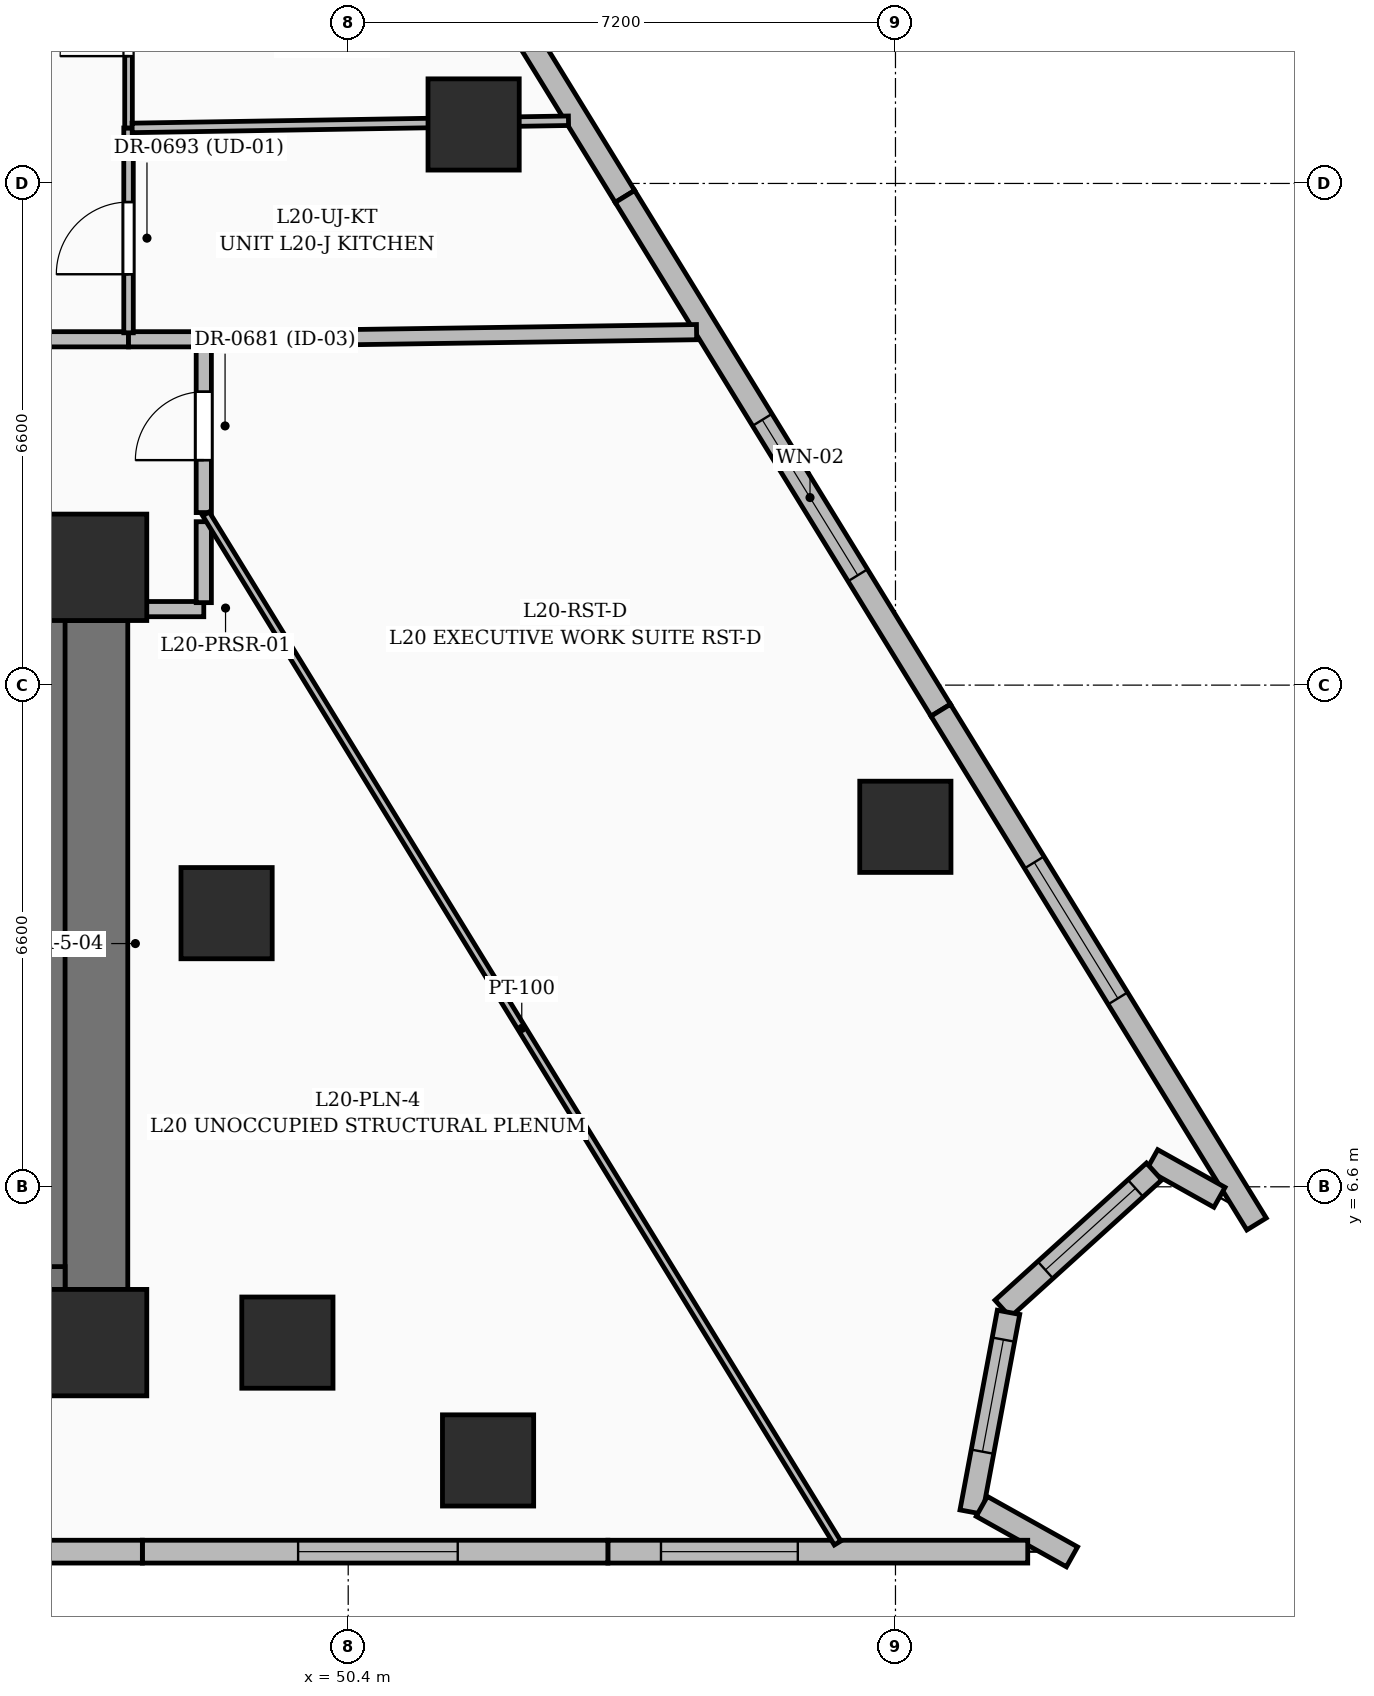
"""IFC4 building model, lengths in metres.
Left out: names, types, materials, properties, quantities, classifications, styles, units other than length and angle.
Written with IfcOpenShell. Run it as: python <this file> out.ifc"""

import sys

from ifc_helpers import new_model, si_unit, direction, frame, frame_2d, origin, origin_2d, place, context, subcontext, project, spatial, rectangle, extrude, element, fill, save


model = new_model("IFC4")
c1 = context("Model", 3, precision=1e-05, world=origin(), true_north=direction((0.0, 1.0)))
c2 = subcontext(c1, "Body", "Model", "MODEL_VIEW")
j1 = project(units=[si_unit("LENGTHUNIT", "METRE"), si_unit("PLANEANGLEUNIT", "RADIAN")], contexts=[c1])
p1 = place(None, origin())
s1 = spatial("IfcSite", under=j1, at=p1, CompositionType="ELEMENT")
p2 = place(p1, origin())
s2 = spatial("IfcBuilding", under=s1, at=p2, CompositionType="ELEMENT")
p3 = place(p2, frame((0.0, 0.0, 82.2)))
s3 = spatial("IfcBuildingStorey", under=s2, at=p3, CompositionType="ELEMENT", Elevation=82.2)
for number, where, z_axis, x_axis in (
    (1, (47.05, 4.55, 0.0), (0.0, 0.0, 1.0), (1.0, 0.0, 0.0)),
    (2, (47.05, 14.75, 0.0), (0.0, 0.0, 1.0), (1.0, 0.0, 0.0)),
):
    element("IfcColumn", number, at=place(p3, frame(where, z_axis=z_axis, x_axis=x_axis)), inside=s3, PredefinedType="COLUMN", context=c2, shape_type="SweptSolid", body=[
        extrude(rectangle(XDim=1.4, YDim=1.4, at=origin_2d()), origin(), (0.0, 0.0, 1.0), 3.6),
    ])
for number, where, z_axis, x_axis in (
    (3, (49.6, 4.55, 0.0), (0.0, 0.0, 1.0), (1.0, 0.0, 0.0)),
    (4, (48.8, 10.2, 0.0), (0.0, 0.0, 1.0), (1.0, 0.0, 0.0)),
):
    element("IfcColumn", number, at=place(p3, frame(where, z_axis=z_axis, x_axis=x_axis)), inside=s3, PredefinedType="COLUMN", context=c2, shape_type="SweptSolid", body=[
        extrude(rectangle(XDim=1.2, YDim=1.2, at=origin_2d()), origin(), (0.0, 0.0, 1.0), 3.6),
    ])
p4 = place(p3, frame((47.05, 5.25, 0.0), z_axis=(0.0, 0.0, 1.0), x_axis=(0.0, 1.0, 0.0)))
e5 = element("IfcWall", 5, at=p4, inside=s3, PredefinedType="SHEAR", context=c2, shape_type="SweptSolid", body=[
    extrude(rectangle(XDim=8.8, YDim=0.9, at=frame_2d((4.4, 0.0))), origin(), (0.0, 0.0, 1.0), 3.6),
])
p5 = place(p3, frame((46.5, 5.2, 0.0), z_axis=(0.0, 0.0, 1.0), x_axis=(0.0, 1.0, 0.0)))
e6 = element("IfcWall", 6, at=p5, inside=s3, PredefinedType="SOLIDWALL", context=c2, shape_type="SweptSolid", body=[
    extrude(rectangle(XDim=9.1, YDim=0.35, at=frame_2d((4.55, 0.0))), origin(), (0.0, 0.0, 1.0), 3.6),
])
p6 = place(p3, frame((43.125, 5.375, 0.0), z_axis=(0.0, 0.0, 1.0), x_axis=(1.0, 0.0, 0.0)))
e7 = element("IfcWall", 7, at=p6, inside=s3, PredefinedType="SOLIDWALL", context=c2, shape_type="SweptSolid", body=[
    extrude(rectangle(XDim=3.55, YDim=0.35, at=frame_2d((1.775, 0.0))), origin(), (0.0, 0.0, 1.0), 3.6),
])
for number, where, z_axis, x_axis in (
    (8, (52.24, 3.0, 0.0), (0.0, 0.0, 1.0), (1.0, 0.0, 0.0)),
    (9, (57.73, 11.336, 0.0), (0.0, 0.0, 1.0), (1.0, 0.0, 0.0)),
    (10, (52.05, 20.576, 0.0), (0.0, 0.0, 1.0), (1.0, 0.0, 0.0)),
):
    element("IfcColumn", number, at=place(p3, frame(where, z_axis=z_axis, x_axis=x_axis)), inside=s3, PredefinedType="COLUMN", context=c2, shape_type="SweptSolid", body=[
        extrude(rectangle(XDim=1.2, YDim=1.2, at=origin_2d()), origin(), (0.0, 0.0, 1.0), 3.6),
    ])
p7 = place(p3, frame((50.032, 26.15, 0.0), z_axis=(0.0, 0.0, 1.0), x_axis=(0.523673810553, -0.851918857721, 0.0)))
e11 = element("IfcWall", 11, at=p7, inside=s3, PredefinedType="SOLIDWALL", context=c2, shape_type="SweptSolid", body=[
    extrude(rectangle(XDim=7.654, YDim=0.3, at=frame_2d((3.827, 0.0))), origin(), (0.0, 0.0, 1.0), 3.35),
])
p8 = place(p7, frame((0.895, 0.0, 0.8)))
e12 = element("IfcOpeningElement", 12, at=p8, cuts=e11, PredefinedType="OPENING", context=c2, shape_type="SweptSolid", body=[
    extrude(rectangle(XDim=1.2, YDim=1.8, at=frame_2d((0.6, 0.9))), frame((0.0, 0.16, 0.0), z_axis=(0.0, -1.0, 0.0), x_axis=(1.0, 0.0, 0.0)), (0.0, 0.0, 1.0), 0.32),
])
p9 = place(p7, frame((4.02, 0.0, 0.8)))
e13 = element("IfcOpeningElement", 13, at=p9, cuts=e11, PredefinedType="OPENING", context=c2, shape_type="SweptSolid", body=[
    extrude(rectangle(XDim=1.2, YDim=1.8, at=frame_2d((0.6, 0.9))), frame((0.0, 0.16, 0.0), z_axis=(0.0, -1.0, 0.0), x_axis=(1.0, 0.0, 0.0)), (0.0, 0.0, 1.0), 0.32),
])
p10 = place(p3, frame((54.041, 19.629, 0.0), z_axis=(0.0, 0.0, 1.0), x_axis=(0.523661280051, -0.851926560083, 0.0)))
e14 = element("IfcWall", 14, at=p10, inside=s3, PredefinedType="SOLIDWALL", context=c2, shape_type="SweptSolid", body=[
    extrude(rectangle(XDim=7.934, YDim=0.3, at=frame_2d((3.967, 0.0))), origin(), (0.0, 0.0, 1.0), 3.35),
])
p11 = place(p10, frame((3.45, 0.0, 0.6)))
e15 = element("IfcOpeningElement", 15, at=p11, cuts=e14, PredefinedType="OPENING", context=c2, shape_type="SweptSolid", body=[
    extrude(rectangle(XDim=2.4, YDim=2.1, at=frame_2d((1.2, 1.05))), frame((0.0, 0.16, 0.0), z_axis=(0.0, -1.0, 0.0), x_axis=(1.0, 0.0, 0.0)), (0.0, 0.0, 1.0), 0.32),
])
p12 = place(p3, frame((58.195, 12.87, 0.0), z_axis=(0.0, 0.0, 1.0), x_axis=(0.52368361247, -0.851912832413, 0.0)))
e16 = element("IfcWall", 16, at=p12, inside=s3, PredefinedType="SOLIDWALL", context=c2, shape_type="SweptSolid", body=[
    extrude(rectangle(XDim=7.934, YDim=0.3, at=frame_2d((3.967, 0.0))), origin(), (0.0, 0.0, 1.0), 3.35),
])
p13 = place(p12, frame((2.35, 0.0, 0.55)))
e17 = element("IfcOpeningElement", 17, at=p13, cuts=e16, PredefinedType="OPENING", context=c2, shape_type="SweptSolid", body=[
    extrude(rectangle(XDim=2.1, YDim=2.4, at=frame_2d((1.05, 1.2))), frame((0.0, 0.16, 0.0), z_axis=(0.0, -1.0, 0.0), x_axis=(1.0, 0.0, 0.0)), (0.0, 0.0, 1.0), 0.32),
])
p14 = place(p3, frame((61.863, 6.462, 0.0), z_axis=(0.0, 0.0, 1.0), x_axis=(-0.872678236231, 0.488295705499, 0.0)))
e18 = element("IfcWall", 18, at=p14, inside=s3, PredefinedType="SOLIDWALL", context=c2, shape_type="SweptSolid", body=[
    extrude(rectangle(XDim=1.015, YDim=0.3, at=frame_2d((0.507, 0.0))), origin(), (0.0, 0.0, 1.0), 3.35),
])
p15 = place(p3, frame((61.003, 6.802, 0.0), z_axis=(0.0, 0.0, 1.0), x_axis=(-0.741163448221, -0.671324618215, 0.0)))
e19 = element("IfcWall", 19, at=p15, inside=s3, PredefinedType="SOLIDWALL", context=c2, shape_type="SweptSolid", body=[
    extrude(rectangle(XDim=2.688, YDim=0.3, at=frame_2d((1.344, 0.0))), origin(), (0.0, 0.0, 1.0), 3.35),
])
p16 = place(p15, frame((0.33, 0.0, 0.55)))
e20 = element("IfcOpeningElement", 20, at=p16, cuts=e19, PredefinedType="OPENING", context=c2, shape_type="SweptSolid", body=[
    extrude(rectangle(XDim=1.6, YDim=2.2, at=frame_2d((0.8, 1.1))), frame((0.0, 0.16, 0.0), z_axis=(0.0, -1.0, 0.0), x_axis=(1.0, 0.0, 0.0)), (0.0, 0.0, 1.0), 0.32),
])
p17 = place(p3, frame((59.087, 4.948, 0.0), z_axis=(0.0, 0.0, 1.0), x_axis=(-0.183786629236, -0.982966161632, 0.0)))
e21 = element("IfcWall", 21, at=p17, inside=s3, PredefinedType="SOLIDWALL", context=c2, shape_type="SweptSolid", body=[
    extrude(rectangle(XDim=2.673, YDim=0.3, at=frame_2d((1.336, 0.0))), origin(), (0.0, 0.0, 1.0), 3.35),
])
p18 = place(p17, frame((0.365, 0.0, 0.6)))
e22 = element("IfcOpeningElement", 22, at=p18, cuts=e21, PredefinedType="OPENING", context=c2, shape_type="SweptSolid", body=[
    extrude(rectangle(XDim=1.5, YDim=2.1, at=frame_2d((0.75, 1.05))), frame((0.0, 0.16, 0.0), z_axis=(0.0, -1.0, 0.0), x_axis=(1.0, 0.0, 0.0)), (0.0, 0.0, 1.0), 0.32),
])
p19 = place(p3, frame((58.735, 2.396, 0.0), z_axis=(0.0, 0.0, 1.0), x_axis=(0.872747775204, -0.488171405221, 0.0)))
e23 = element("IfcWall", 23, at=p19, inside=s3, PredefinedType="SOLIDWALL", context=c2, shape_type="SweptSolid", body=[
    extrude(rectangle(XDim=1.36, YDim=0.3, at=frame_2d((0.68, 0.0))), origin(), (0.0, 0.0, 1.0), 3.35),
])
p20 = place(p3, frame((59.34, 1.8, 0.0), z_axis=(0.0, 0.0, 1.0), x_axis=(-1.0, 0.0, 0.0)))
e24 = element("IfcWall", 24, at=p20, inside=s3, PredefinedType="SOLIDWALL", context=c2, shape_type="SweptSolid", body=[
    extrude(rectangle(XDim=5.524, YDim=0.3, at=frame_2d((2.762, 0.0))), origin(), (0.0, 0.0, 1.0), 3.35),
])
p21 = place(p20, frame((3.025, 0.0, 0.6)))
e25 = element("IfcOpeningElement", 25, at=p21, cuts=e24, PredefinedType="OPENING", context=c2, shape_type="SweptSolid", body=[
    extrude(rectangle(XDim=1.8, YDim=2.1, at=frame_2d((0.9, 1.05))), frame((0.0, 0.16, 0.0), z_axis=(0.0, -1.0, 0.0), x_axis=(1.0, 0.0, 0.0)), (0.0, 0.0, 1.0), 0.32),
])
p22 = place(p3, frame((53.816, 1.8, 0.0), z_axis=(0.0, 0.0, 1.0), x_axis=(-1.0, 0.0, 0.0)))
e26 = element("IfcWall", 26, at=p22, inside=s3, PredefinedType="SOLIDWALL", context=c2, shape_type="SweptSolid", body=[
    extrude(rectangle(XDim=6.124, YDim=0.3, at=frame_2d((3.062, 0.0))), origin(), (0.0, 0.0, 1.0), 3.35),
])
p23 = place(p22, frame((1.975, 0.0, 0.55)))
e27 = element("IfcOpeningElement", 27, at=p23, cuts=e26, PredefinedType="OPENING", context=c2, shape_type="SweptSolid", body=[
    extrude(rectangle(XDim=2.1, YDim=2.4, at=frame_2d((1.05, 1.2))), frame((0.0, 0.16, 0.0), z_axis=(0.0, -1.0, 0.0), x_axis=(1.0, 0.0, 0.0)), (0.0, 0.0, 1.0), 0.32),
])
p24 = place(p3, frame((47.692, 1.8, 0.0), z_axis=(0.0, 0.0, 1.0), x_axis=(-1.0, 0.0, 0.0)))
e28 = element("IfcWall", 28, at=p24, inside=s3, PredefinedType="SOLIDWALL", context=c2, shape_type="SweptSolid", body=[
    extrude(rectangle(XDim=6.124, YDim=0.3, at=frame_2d((3.062, 0.0))), origin(), (0.0, 0.0, 1.0), 3.35),
])
p25 = place(p24, frame((2.125, 0.0, 0.6)))
e29 = element("IfcOpeningElement", 29, at=p25, cuts=e28, PredefinedType="OPENING", context=c2, shape_type="SweptSolid", body=[
    extrude(rectangle(XDim=1.8, YDim=2.1, at=frame_2d((0.9, 1.05))), frame((0.0, 0.16, 0.0), z_axis=(0.0, -1.0, 0.0), x_axis=(1.0, 0.0, 0.0)), (0.0, 0.0, 1.0), 0.32),
])
p26 = place(p3, frame((47.5, 14.2, 0.0), z_axis=(0.0, 0.0, 1.0), x_axis=(1.0, 0.0, 0.0)))
e30 = element("IfcWall", 30, at=p26, inside=s3, PredefinedType="PARTITIONING", context=c2, shape_type="SweptSolid", body=[
    extrude(rectangle(XDim=1.0, YDim=0.2, at=frame_2d((0.5, 0.0))), origin(), (0.0, 0.0, 1.0), 3.35),
])
p27 = place(p3, frame((48.5, 14.285, 0.0), z_axis=(0.0, 0.0, 1.0), x_axis=(0.0, 1.0, 0.0)))
e31 = element("IfcWall", 31, at=p27, inside=s3, PredefinedType="PARTITIONING", context=c2, shape_type="SweptSolid", body=[
    extrude(rectangle(XDim=1.065, YDim=0.2, at=frame_2d((0.533, 0.0))), origin(), (0.0, 0.0, 1.0), 3.35),
])
p28 = place(p3, frame((48.5, 15.47, 0.0), z_axis=(0.0, 0.0, 1.0), x_axis=(0.0, 1.0, 0.0)))
e32 = element("IfcWall", 32, at=p28, inside=s3, PredefinedType="PARTITIONING", context=c2, shape_type="SweptSolid", body=[
    extrude(rectangle(XDim=2.28, YDim=0.2, at=frame_2d((1.14, 0.0))), origin(), (0.0, 0.0, 1.0), 2.345),
])
p29 = place(p28, frame((0.69, 0.0, 0.0)))
e33 = element("IfcOpeningElement", 33, at=p29, cuts=e32, PredefinedType="OPENING", context=c2, shape_type="SweptSolid", body=[
    extrude(rectangle(XDim=0.9, YDim=2.1, at=frame_2d((0.45, 1.05))), frame((0.0, 0.11, 0.0), z_axis=(0.0, -1.0, 0.0), x_axis=(1.0, 0.0, 0.0)), (0.0, 0.0, 1.0), 0.22),
])
p30 = place(p3, frame((47.51, 17.75, 0.0), z_axis=(0.0, 0.0, 1.0), x_axis=(-1.0, 0.0, 0.0)))
e34 = element("IfcWall", 34, at=p30, inside=s3, PredefinedType="PARTITIONING", context=c2, shape_type="SweptSolid", body=[
    extrude(rectangle(XDim=5.57, YDim=0.2, at=frame_2d((2.785, 0.0))), origin(), (0.0, 0.0, 1.0), 2.309),
])
p31 = place(p30, frame((3.0, 0.0, 0.0)))
e35 = element("IfcOpeningElement", 35, at=p31, cuts=e34, PredefinedType="OPENING", context=c2, shape_type="SweptSolid", body=[
    extrude(rectangle(XDim=1.0, YDim=2.2, at=frame_2d((0.5, 1.1))), frame((0.0, 0.11, 0.0), z_axis=(0.0, -1.0, 0.0), x_axis=(1.0, 0.0, 0.0)), (0.0, 0.0, 1.0), 0.22),
])
p32 = place(p3, frame((48.415, 17.75, 0.0), z_axis=(0.0, 0.0, 1.0), x_axis=(-1.0, 0.0, 0.0)))
e36 = element("IfcWall", 36, at=p32, inside=s3, PredefinedType="PARTITIONING", context=c2, shape_type="SweptSolid", body=[
    extrude(rectangle(XDim=0.905, YDim=0.2, at=frame_2d((0.453, 0.0))), origin(), (0.0, 0.0, 1.0), 2.709),
])
p33 = place(p3, frame((48.529, 15.453, 0.0), z_axis=(0.0, 0.0, 1.0), x_axis=(0.52306290803, -0.852294077325, 0.0)))
e37 = element("IfcWall", 37, at=p33, inside=s3, PredefinedType="PARTITIONING", context=c2, shape_type="SweptSolid", body=[
    extrude(rectangle(XDim=15.885, YDim=0.1, at=frame_2d((7.943, 0.0))), origin(), (0.0, 0.0, 1.0), 2.345),
])
p34 = place(p3, frame((54.983, 17.844, 0.0), z_axis=(0.0, 0.0, 1.0), x_axis=(-0.999894330503, -0.014537118977, 0.0)))
e38 = element("IfcWall", 38, at=p34, inside=s3, PredefinedType="PARTITIONING", context=c2, shape_type="SweptSolid", body=[
    extrude(rectangle(XDim=6.399, YDim=0.2, at=frame_2d((3.199, 0.0))), origin(), (0.0, 0.0, 1.0), 2.345),
])
p35 = place(p3, frame((47.51, 17.835, 0.0), z_axis=(0.0, 0.0, 1.0), x_axis=(0.0, 1.0, 0.0)))
e39 = element("IfcWall", 39, at=p35, inside=s3, PredefinedType="PARTITIONING", context=c2, shape_type="SweptSolid", body=[
    extrude(rectangle(XDim=2.695, YDim=0.125, at=frame_2d((1.348, 0.0))), origin(), (0.0, 0.0, 1.0), 2.709),
])
p36 = place(p35, frame((0.771, 0.0, 0.0)))
e40 = element("IfcOpeningElement", 40, at=p36, cuts=e39, PredefinedType="OPENING", context=c2, shape_type="SweptSolid", body=[
    extrude(rectangle(XDim=0.95, YDim=2.2, at=frame_2d((0.475, 1.1))), frame((0.0, 0.072, 0.0), z_axis=(0.0, -1.0, 0.0), x_axis=(1.0, 0.0, 0.0)), (0.0, 0.0, 1.0), 0.145),
])
p37 = place(p3, frame((47.51, 20.53, 0.0), z_axis=(0.0, 0.0, 1.0), x_axis=(0.0, 1.0, 0.0)))
e41 = element("IfcWall", 41, at=p37, inside=s3, PredefinedType="PARTITIONING", context=c2, shape_type="SweptSolid", body=[
    extrude(rectangle(XDim=2.79, YDim=0.1, at=frame_2d((1.395, 0.0))), origin(), (0.0, 0.0, 1.0), 2.709),
])
p38 = place(p37, frame((0.945, 0.0, 0.0)))
e42 = element("IfcOpeningElement", 42, at=p38, cuts=e41, PredefinedType="OPENING", context=c2, shape_type="SweptSolid", body=[
    extrude(rectangle(XDim=0.9, YDim=2.15, at=frame_2d((0.45, 1.075))), frame((0.0, 0.06, 0.0), z_axis=(0.0, -1.0, 0.0), x_axis=(1.0, 0.0, 0.0)), (0.0, 0.0, 1.0), 0.12),
])
p39 = place(p3, frame((53.298, 20.625, 0.0), z_axis=(0.0, 0.0, 1.0), x_axis=(-0.9998645785, -0.016456751239, 0.0)))
e43 = element("IfcWall", 43, at=p39, inside=s3, PredefinedType="PARTITIONING", context=c2, shape_type="SweptSolid", body=[
    extrude(rectangle(XDim=5.741, YDim=0.125, at=frame_2d((2.871, 0.0))), origin(), (0.0, 0.0, 1.0), 2.709),
])
p40 = place(p11, origin())
e44 = element("IfcWindow", 44, at=p40, inside=s3, PartitioningType="SINGLE_PANEL", PredefinedType="WINDOW", context=c2, shape_type="SweptSolid", body=[
    extrude(rectangle(XDim=2.4, YDim=2.1, at=frame_2d((1.2, 1.05))), frame((0.0, 0.03, 0.0), z_axis=(0.0, -1.0, 0.0), x_axis=(1.0, 0.0, 0.0)), (0.0, 0.0, 1.0), 0.06),
])
fill(e15, e44)
p41 = place(p13, origin())
e45 = element("IfcWindow", 45, at=p41, inside=s3, PartitioningType="SINGLE_PANEL", PredefinedType="WINDOW", context=c2, shape_type="SweptSolid", body=[
    extrude(rectangle(XDim=2.1, YDim=2.4, at=frame_2d((1.05, 1.2))), frame((0.0, 0.03, 0.0), z_axis=(0.0, -1.0, 0.0), x_axis=(1.0, 0.0, 0.0)), (0.0, 0.0, 1.0), 0.06),
])
fill(e17, e45)
p42 = place(p16, origin())
e46 = element("IfcWindow", 46, at=p42, inside=s3, PartitioningType="SINGLE_PANEL", PredefinedType="WINDOW", context=c2, shape_type="SweptSolid", body=[
    extrude(rectangle(XDim=1.6, YDim=2.2, at=frame_2d((0.8, 1.1))), frame((0.0, 0.03, 0.0), z_axis=(0.0, -1.0, 0.0), x_axis=(1.0, 0.0, 0.0)), (0.0, 0.0, 1.0), 0.06),
])
fill(e20, e46)
p43 = place(p18, origin())
e47 = element("IfcWindow", 47, at=p43, inside=s3, PartitioningType="SINGLE_PANEL", PredefinedType="WINDOW", context=c2, shape_type="SweptSolid", body=[
    extrude(rectangle(XDim=1.5, YDim=2.1, at=frame_2d((0.75, 1.05))), frame((0.0, 0.03, 0.0), z_axis=(0.0, -1.0, 0.0), x_axis=(1.0, 0.0, 0.0)), (0.0, 0.0, 1.0), 0.06),
])
fill(e22, e47)
p44 = place(p21, origin())
e48 = element("IfcWindow", 48, at=p44, inside=s3, PartitioningType="SINGLE_PANEL", PredefinedType="WINDOW", context=c2, shape_type="SweptSolid", body=[
    extrude(rectangle(XDim=1.8, YDim=2.1, at=frame_2d((0.9, 1.05))), frame((0.0, 0.03, 0.0), z_axis=(0.0, -1.0, 0.0), x_axis=(1.0, 0.0, 0.0)), (0.0, 0.0, 1.0), 0.06),
])
fill(e25, e48)
p45 = place(p23, origin())
e49 = element("IfcWindow", 49, at=p45, inside=s3, PartitioningType="SINGLE_PANEL", PredefinedType="WINDOW", context=c2, shape_type="SweptSolid", body=[
    extrude(rectangle(XDim=2.1, YDim=2.4, at=frame_2d((1.05, 1.2))), frame((0.0, 0.03, 0.0), z_axis=(0.0, -1.0, 0.0), x_axis=(1.0, 0.0, 0.0)), (0.0, 0.0, 1.0), 0.06),
])
fill(e27, e49)
p46 = place(p29, origin())
e50 = element("IfcDoor", 50, at=p46, inside=s3, OperationType="SINGLE_SWING_LEFT", PredefinedType="DOOR", context=c2, shape_type="SweptSolid", body=[
    extrude(rectangle(XDim=0.9, YDim=2.1, at=frame_2d((0.45, 1.05))), frame((0.0, 0.025, 0.0), z_axis=(0.0, -1.0, 0.0), x_axis=(1.0, 0.0, 0.0)), (0.0, 0.0, 1.0), 0.05),
])
fill(e33, e50)
p47 = place(p36, origin())
e51 = element("IfcDoor", 51, at=p47, inside=s3, OperationType="SINGLE_SWING_LEFT", PredefinedType="DOOR", context=c2, shape_type="SweptSolid", body=[
    extrude(rectangle(XDim=0.95, YDim=2.2, at=frame_2d((0.475, 1.1))), frame((0.0, 0.025, 0.0), z_axis=(0.0, -1.0, 0.0), x_axis=(1.0, 0.0, 0.0)), (0.0, 0.0, 1.0), 0.05),
])
fill(e40, e51)
p48 = place(p38, origin())
e52 = element("IfcDoor", 52, at=p48, inside=s3, OperationType="SINGLE_SWING_LEFT", PredefinedType="DOOR", context=c2, shape_type="SweptSolid", body=[
    extrude(rectangle(XDim=0.9, YDim=2.15, at=frame_2d((0.45, 1.075))), frame((0.0, 0.025, 0.0), z_axis=(0.0, -1.0, 0.0), x_axis=(1.0, 0.0, 0.0)), (0.0, 0.0, 1.0), 0.05),
])
fill(e42, e52)
save(model, sys.argv[1])
